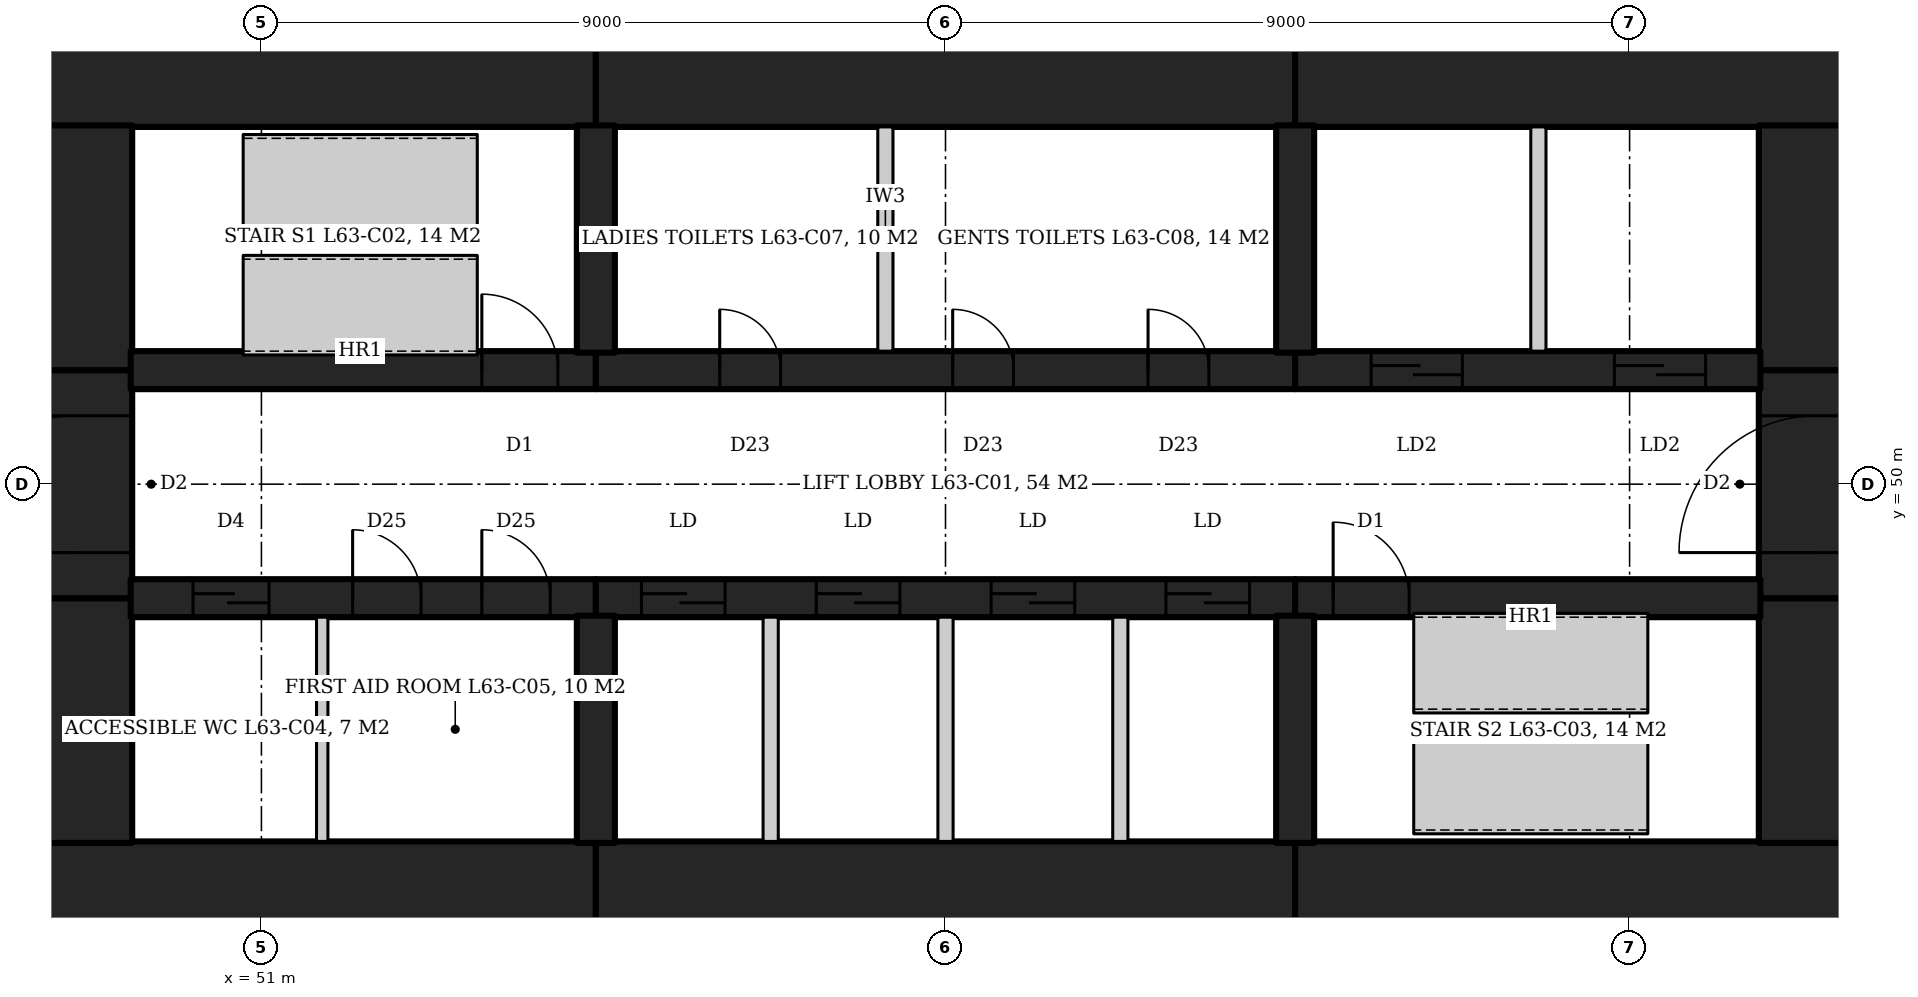
"""IFC4 building model, lengths in metres.
Left out: names, types, materials, properties, quantities, classifications, styles, units other than length and angle.
Written with IfcOpenShell. Run it as: python <this file> out.ifc"""

import sys

from ifc_helpers import new_model, si_unit, direction, frame, frame_2d, origin, place, context, subcontext, project, spatial, rectangle, extrude, element, fill, save


model = new_model("IFC4")
c1 = context("Model", 3, precision=1e-05, world=origin(), true_north=direction((0.0, 1.0)))
c2 = subcontext(c1, "Body", "Model", "MODEL_VIEW")
j1 = project(units=[si_unit("LENGTHUNIT", "METRE"), si_unit("PLANEANGLEUNIT", "RADIAN")], contexts=[c1])
p1 = place(None, origin())
s1 = spatial("IfcSite", under=j1, at=p1, CompositionType="ELEMENT")
p2 = place(p1, origin())
s2 = spatial("IfcBuilding", under=s1, at=p2, CompositionType="ELEMENT")
p3 = place(p2, frame((0.0, 0.0, 269.6)))
s3 = spatial("IfcBuildingStorey", under=s2, at=p3, CompositionType="ELEMENT", Elevation=269.6)
p4 = place(p3, frame((47.8, 55.45, 0.0), z_axis=(0.0, 0.0, 1.0), x_axis=(1.0, 0.0, 0.0)))
e1 = element("IfcWall", 1, at=p4, inside=s3, PredefinedType="SHEAR", context=c2, shape_type="SweptSolid", body=[
    extrude(rectangle(XDim=7.6, YDim=1.5, at=frame_2d((3.8, 0.0))), origin(), (0.0, 0.0, 1.0), 4.2),
])
p5 = place(p3, frame((55.4, 55.45, 0.0), z_axis=(0.0, 0.0, 1.0), x_axis=(1.0, 0.0, 0.0)))
e2 = element("IfcWall", 2, at=p5, inside=s3, PredefinedType="SHEAR", context=c2, shape_type="SweptSolid", body=[
    extrude(rectangle(XDim=9.2, YDim=1.5, at=frame_2d((4.6, 0.0))), origin(), (0.0, 0.0, 1.0), 4.2),
])
for number, where, z_axis, x_axis in (
    (3, (64.6, 55.45, 0.0), (0.0, 0.0, 1.0), (1.0, 0.0, 0.0)),
    (4, (47.8, 44.55, 0.0), (0.0, 0.0, 1.0), (1.0, 0.0, 0.0)),
):
    element("IfcWall", number, at=place(p3, frame(where, z_axis=z_axis, x_axis=x_axis)), inside=s3, PredefinedType="SHEAR", context=c2, shape_type="SweptSolid", body=[
        extrude(rectangle(XDim=7.6, YDim=1.5, at=frame_2d((3.8, 0.0))), origin(), (0.0, 0.0, 1.0), 4.2),
    ])
p6 = place(p3, frame((55.4, 44.55, 0.0), z_axis=(0.0, 0.0, 1.0), x_axis=(1.0, 0.0, 0.0)))
e5 = element("IfcWall", 5, at=p6, inside=s3, PredefinedType="SHEAR", context=c2, shape_type="SweptSolid", body=[
    extrude(rectangle(XDim=9.2, YDim=1.5, at=frame_2d((4.6, 0.0))), origin(), (0.0, 0.0, 1.0), 4.2),
])
p7 = place(p3, frame((64.6, 44.55, 0.0), z_axis=(0.0, 0.0, 1.0), x_axis=(1.0, 0.0, 0.0)))
e6 = element("IfcWall", 6, at=p7, inside=s3, PredefinedType="SHEAR", context=c2, shape_type="SweptSolid", body=[
    extrude(rectangle(XDim=7.6, YDim=1.5, at=frame_2d((3.8, 0.0))), origin(), (0.0, 0.0, 1.0), 4.2),
])
p8 = place(p3, frame((71.45, 45.28, 0.0), z_axis=(0.0, 0.0, 1.0), x_axis=(0.0, 1.0, 0.0)))
e7 = element("IfcWall", 7, at=p8, inside=s3, PredefinedType="SHEAR", context=c2, shape_type="SweptSolid", body=[
    extrude(rectangle(XDim=3.22, YDim=1.5, at=frame_2d((1.61, 0.0))), origin(), (0.0, 0.0, 1.0), 4.2),
])
p9 = place(p3, frame((71.45, 48.5, 0.0), z_axis=(0.0, 0.0, 1.0), x_axis=(0.0, 1.0, 0.0)))
e8 = element("IfcWall", 8, at=p9, inside=s3, PredefinedType="SHEAR", context=c2, shape_type="SweptSolid", body=[
    extrude(rectangle(XDim=3.0, YDim=1.5, at=frame_2d((1.5, 0.0))), origin(), (0.0, 0.0, 1.0), 4.2),
])
p10 = place(p9, frame((0.6, 0.0, 0.0)))
e9 = element("IfcOpeningElement", 9, at=p10, cuts=e8, PredefinedType="OPENING", context=c2, shape_type="SweptSolid", body=[
    extrude(rectangle(XDim=1.8, YDim=2.1, at=frame_2d((0.9, 1.05))), frame((0.0, 0.76, 0.0), z_axis=(0.0, -1.0, 0.0), x_axis=(1.0, 0.0, 0.0)), (0.0, 0.0, 1.0), 1.52),
])
for number, where, z_axis, x_axis in (
    (10, (71.45, 51.5, 0.0), (0.0, 0.0, 1.0), (0.0, 1.0, 0.0)),
    (11, (48.55, 45.28, 0.0), (0.0, 0.0, 1.0), (0.0, 1.0, 0.0)),
):
    element("IfcWall", number, at=place(p3, frame(where, z_axis=z_axis, x_axis=x_axis)), inside=s3, PredefinedType="SHEAR", context=c2, shape_type="SweptSolid", body=[
        extrude(rectangle(XDim=3.22, YDim=1.5, at=frame_2d((1.61, 0.0))), origin(), (0.0, 0.0, 1.0), 4.2),
    ])
p11 = place(p3, frame((48.55, 48.5, 0.0), z_axis=(0.0, 0.0, 1.0), x_axis=(0.0, 1.0, 0.0)))
e12 = element("IfcWall", 12, at=p11, inside=s3, PredefinedType="SHEAR", context=c2, shape_type="SweptSolid", body=[
    extrude(rectangle(XDim=3.0, YDim=1.5, at=frame_2d((1.5, 0.0))), origin(), (0.0, 0.0, 1.0), 4.2),
])
p12 = place(p11, frame((0.6, 0.0, 0.0)))
e13 = element("IfcOpeningElement", 13, at=p12, cuts=e12, PredefinedType="OPENING", context=c2, shape_type="SweptSolid", body=[
    extrude(rectangle(XDim=1.8, YDim=2.1, at=frame_2d((0.9, 1.05))), frame((0.0, 0.76, 0.0), z_axis=(0.0, -1.0, 0.0), x_axis=(1.0, 0.0, 0.0)), (0.0, 0.0, 1.0), 1.52),
])
p13 = place(p3, frame((48.55, 51.5, 0.0), z_axis=(0.0, 0.0, 1.0), x_axis=(0.0, 1.0, 0.0)))
e14 = element("IfcWall", 14, at=p13, inside=s3, PredefinedType="SHEAR", context=c2, shape_type="SweptSolid", body=[
    extrude(rectangle(XDim=3.22, YDim=1.5, at=frame_2d((1.61, 0.0))), origin(), (0.0, 0.0, 1.0), 4.2),
])
p14 = place(p3, frame((49.28, 51.5, 0.0), z_axis=(0.0, 0.0, 1.0), x_axis=(1.0, 0.0, 0.0)))
e15 = element("IfcWall", 15, at=p14, inside=s3, PredefinedType="SHEAR", context=c2, shape_type="SweptSolid", body=[
    extrude(rectangle(XDim=6.12, YDim=0.35, at=frame_2d((3.06, 0.0))), origin(), (0.0, 0.0, 1.0), 4.2),
])
p15 = place(p14, frame((4.62, 0.0, 0.0)))
e16 = element("IfcOpeningElement", 16, at=p15, cuts=e15, PredefinedType="OPENING", context=c2, shape_type="SweptSolid", body=[
    extrude(rectangle(XDim=1.0, YDim=2.1, at=frame_2d((0.5, 1.05))), frame((0.0, 0.185, 0.0), z_axis=(0.0, -1.0, 0.0), x_axis=(1.0, 0.0, 0.0)), (0.0, 0.0, 1.0), 0.37),
])
p16 = place(p3, frame((55.4, 51.5, 0.0), z_axis=(0.0, 0.0, 1.0), x_axis=(1.0, 0.0, 0.0)))
e17 = element("IfcWall", 17, at=p16, inside=s3, PredefinedType="SHEAR", context=c2, shape_type="SweptSolid", body=[
    extrude(rectangle(XDim=9.2, YDim=0.35, at=frame_2d((4.6, 0.0))), origin(), (0.0, 0.0, 1.0), 4.2),
])
p17 = place(p16, frame((1.585, 0.0, 0.0)))
e18 = element("IfcOpeningElement", 18, at=p17, cuts=e17, PredefinedType="OPENING", context=c2, shape_type="SweptSolid", body=[
    extrude(rectangle(XDim=0.8, YDim=2.1, at=frame_2d((0.4, 1.05))), frame((0.0, 0.185, 0.0), z_axis=(0.0, -1.0, 0.0), x_axis=(1.0, 0.0, 0.0)), (0.0, 0.0, 1.0), 0.37),
])
p18 = place(p16, frame((4.703, 0.0, 0.0)))
e19 = element("IfcOpeningElement", 19, at=p18, cuts=e17, PredefinedType="OPENING", context=c2, shape_type="SweptSolid", body=[
    extrude(rectangle(XDim=0.8, YDim=2.1, at=frame_2d((0.4, 1.05))), frame((0.0, 0.185, 0.0), z_axis=(0.0, -1.0, 0.0), x_axis=(1.0, 0.0, 0.0)), (0.0, 0.0, 1.0), 0.37),
])
p19 = place(p16, frame((7.318, 0.0, 0.0)))
e20 = element("IfcOpeningElement", 20, at=p19, cuts=e17, PredefinedType="OPENING", context=c2, shape_type="SweptSolid", body=[
    extrude(rectangle(XDim=0.8, YDim=2.1, at=frame_2d((0.4, 1.05))), frame((0.0, 0.185, 0.0), z_axis=(0.0, -1.0, 0.0), x_axis=(1.0, 0.0, 0.0)), (0.0, 0.0, 1.0), 0.37),
])
p20 = place(p3, frame((64.6, 51.5, 0.0), z_axis=(0.0, 0.0, 1.0), x_axis=(1.0, 0.0, 0.0)))
e21 = element("IfcWall", 21, at=p20, inside=s3, PredefinedType="SHEAR", context=c2, shape_type="SweptSolid", body=[
    extrude(rectangle(XDim=6.12, YDim=0.35, at=frame_2d((3.06, 0.0))), origin(), (0.0, 0.0, 1.0), 4.2),
])
p21 = place(p20, frame((1.0, 0.0, 0.0)))
e22 = element("IfcOpeningElement", 22, at=p21, cuts=e21, PredefinedType="OPENING", context=c2, shape_type="SweptSolid", body=[
    extrude(rectangle(XDim=1.2, YDim=2.1, at=frame_2d((0.6, 1.05))), frame((0.0, 0.185, 0.0), z_axis=(0.0, -1.0, 0.0), x_axis=(1.0, 0.0, 0.0)), (0.0, 0.0, 1.0), 0.37),
])
p22 = place(p20, frame((4.2, 0.0, 0.0)))
e23 = element("IfcOpeningElement", 23, at=p22, cuts=e21, PredefinedType="OPENING", context=c2, shape_type="SweptSolid", body=[
    extrude(rectangle(XDim=1.2, YDim=2.1, at=frame_2d((0.6, 1.05))), frame((0.0, 0.185, 0.0), z_axis=(0.0, -1.0, 0.0), x_axis=(1.0, 0.0, 0.0)), (0.0, 0.0, 1.0), 0.37),
])
p23 = place(p3, frame((49.28, 48.5, 0.0), z_axis=(0.0, 0.0, 1.0), x_axis=(1.0, 0.0, 0.0)))
e24 = element("IfcWall", 24, at=p23, inside=s3, PredefinedType="SHEAR", context=c2, shape_type="SweptSolid", body=[
    extrude(rectangle(XDim=6.12, YDim=0.35, at=frame_2d((3.06, 0.0))), origin(), (0.0, 0.0, 1.0), 4.2),
])
p24 = place(p23, frame((0.82, 0.0, 0.0)))
e25 = element("IfcOpeningElement", 25, at=p24, cuts=e24, PredefinedType="OPENING", context=c2, shape_type="SweptSolid", body=[
    extrude(rectangle(XDim=1.0, YDim=2.1, at=frame_2d((0.5, 1.05))), frame((0.0, 0.185, 0.0), z_axis=(0.0, -1.0, 0.0), x_axis=(1.0, 0.0, 0.0)), (0.0, 0.0, 1.0), 0.37),
])
p25 = place(p23, frame((2.92, 0.0, 0.0)))
e26 = element("IfcOpeningElement", 26, at=p25, cuts=e24, PredefinedType="OPENING", context=c2, shape_type="SweptSolid", body=[
    extrude(rectangle(XDim=0.9, YDim=2.1, at=frame_2d((0.45, 1.05))), frame((0.0, 0.185, 0.0), z_axis=(0.0, -1.0, 0.0), x_axis=(1.0, 0.0, 0.0)), (0.0, 0.0, 1.0), 0.37),
])
p26 = place(p23, frame((4.62, 0.0, 0.0)))
e27 = element("IfcOpeningElement", 27, at=p26, cuts=e24, PredefinedType="OPENING", context=c2, shape_type="SweptSolid", body=[
    extrude(rectangle(XDim=0.9, YDim=2.1, at=frame_2d((0.45, 1.05))), frame((0.0, 0.185, 0.0), z_axis=(0.0, -1.0, 0.0), x_axis=(1.0, 0.0, 0.0)), (0.0, 0.0, 1.0), 0.37),
])
p27 = place(p3, frame((55.4, 48.5, 0.0), z_axis=(0.0, 0.0, 1.0), x_axis=(1.0, 0.0, 0.0)))
e28 = element("IfcWall", 28, at=p27, inside=s3, PredefinedType="SHEAR", context=c2, shape_type="SweptSolid", body=[
    extrude(rectangle(XDim=9.2, YDim=0.35, at=frame_2d((4.6, 0.0))), origin(), (0.0, 0.0, 1.0), 4.2),
])
p28 = place(p27, frame((0.6, 0.0, 0.0)))
e29 = element("IfcOpeningElement", 29, at=p28, cuts=e28, PredefinedType="OPENING", context=c2, shape_type="SweptSolid", body=[
    extrude(rectangle(XDim=1.1, YDim=2.1, at=frame_2d((0.55, 1.05))), frame((0.0, 0.185, 0.0), z_axis=(0.0, -1.0, 0.0), x_axis=(1.0, 0.0, 0.0)), (0.0, 0.0, 1.0), 0.37),
])
p29 = place(p27, frame((2.9, 0.0, 0.0)))
e30 = element("IfcOpeningElement", 30, at=p29, cuts=e28, PredefinedType="OPENING", context=c2, shape_type="SweptSolid", body=[
    extrude(rectangle(XDim=1.1, YDim=2.1, at=frame_2d((0.55, 1.05))), frame((0.0, 0.185, 0.0), z_axis=(0.0, -1.0, 0.0), x_axis=(1.0, 0.0, 0.0)), (0.0, 0.0, 1.0), 0.37),
])
p30 = place(p27, frame((5.2, 0.0, 0.0)))
e31 = element("IfcOpeningElement", 31, at=p30, cuts=e28, PredefinedType="OPENING", context=c2, shape_type="SweptSolid", body=[
    extrude(rectangle(XDim=1.1, YDim=2.1, at=frame_2d((0.55, 1.05))), frame((0.0, 0.185, 0.0), z_axis=(0.0, -1.0, 0.0), x_axis=(1.0, 0.0, 0.0)), (0.0, 0.0, 1.0), 0.37),
])
p31 = place(p27, frame((7.5, 0.0, 0.0)))
e32 = element("IfcOpeningElement", 32, at=p31, cuts=e28, PredefinedType="OPENING", context=c2, shape_type="SweptSolid", body=[
    extrude(rectangle(XDim=1.1, YDim=2.1, at=frame_2d((0.55, 1.05))), frame((0.0, 0.185, 0.0), z_axis=(0.0, -1.0, 0.0), x_axis=(1.0, 0.0, 0.0)), (0.0, 0.0, 1.0), 0.37),
])
p32 = place(p3, frame((64.6, 48.5, 0.0), z_axis=(0.0, 0.0, 1.0), x_axis=(1.0, 0.0, 0.0)))
e33 = element("IfcWall", 33, at=p32, inside=s3, PredefinedType="SHEAR", context=c2, shape_type="SweptSolid", body=[
    extrude(rectangle(XDim=6.12, YDim=0.35, at=frame_2d((3.06, 0.0))), origin(), (0.0, 0.0, 1.0), 4.2),
])
p33 = place(p32, frame((0.5, 0.0, 0.0)))
e34 = element("IfcOpeningElement", 34, at=p33, cuts=e33, PredefinedType="OPENING", context=c2, shape_type="SweptSolid", body=[
    extrude(rectangle(XDim=1.0, YDim=2.1, at=frame_2d((0.5, 1.05))), frame((0.0, 0.185, 0.0), z_axis=(0.0, -1.0, 0.0), x_axis=(1.0, 0.0, 0.0)), (0.0, 0.0, 1.0), 0.37),
])
for number, where, z_axis, x_axis in (
    (35, (55.4, 51.655, 0.0), (0.0, 0.0, 1.0), (0.0, 1.0, 0.0)),
    (36, (64.6, 51.655, 0.0), (0.0, 0.0, 1.0), (0.0, 1.0, 0.0)),
    (37, (55.4, 48.345, 0.0), (0.0, 0.0, 1.0), (0.0, -1.0, 0.0)),
    (38, (64.6, 48.345, 0.0), (0.0, 0.0, 1.0), (0.0, -1.0, 0.0)),
):
    element("IfcWall", number, at=place(p3, frame(where, z_axis=z_axis, x_axis=x_axis)), inside=s3, PredefinedType="SHEAR", context=c2, shape_type="SweptSolid", body=[
        extrude(rectangle(XDim=3.065, YDim=0.35, at=frame_2d((1.532, 0.0))), origin(), (0.0, 0.0, 1.0), 4.2),
    ])
for number, where, z_axis, x_axis in (
    (39, (57.7, 45.3, 0.0), (0.0, 0.0, 1.0), (0.0, 1.0, 0.0)),
    (40, (60.0, 45.3, 0.0), (0.0, 0.0, 1.0), (0.0, 1.0, 0.0)),
    (41, (62.3, 45.3, 0.0), (0.0, 0.0, 1.0), (0.0, 1.0, 0.0)),
    (42, (67.8, 51.675, 0.0), (0.0, 0.0, 1.0), (0.0, 1.0, 0.0)),
):
    element("IfcWall", number, at=place(p3, frame(where, z_axis=z_axis, x_axis=x_axis)), inside=s3, PredefinedType="PARTITIONING", context=c2, shape_type="SweptSolid", body=[
        extrude(rectangle(XDim=3.025, YDim=0.2, at=frame_2d((1.512, 0.0))), origin(), (0.0, 0.0, 1.0), 4.2),
    ])
p34 = place(p3, frame((51.8, 45.3, 0.0), z_axis=(0.0, 0.0, 1.0), x_axis=(0.0, 1.0, 0.0)))
e43 = element("IfcWall", 43, at=p34, inside=s3, PredefinedType="PARTITIONING", context=c2, shape_type="SweptSolid", body=[
    extrude(rectangle(XDim=3.025, YDim=0.15, at=frame_2d((1.512, 0.0))), origin(), (0.0, 0.0, 1.0), 4.04),
])
p35 = place(p3, frame((59.196, 51.675, 0.0), z_axis=(0.0, 0.0, 1.0), x_axis=(0.0, 1.0, 0.0)))
e44 = element("IfcWall", 44, at=p35, inside=s3, PredefinedType="PARTITIONING", context=c2, shape_type="SweptSolid", body=[
    extrude(rectangle(XDim=3.025, YDim=0.2, at=frame_2d((1.512, 0.0))), origin(), (0.0, 0.0, 1.0), 4.04),
])
p36 = place(p15, origin())
e45 = element("IfcDoor", 45, at=p36, inside=s3, OperationType="SINGLE_SWING_LEFT", PredefinedType="DOOR", context=c2, shape_type="SweptSolid", body=[
    extrude(rectangle(XDim=1.0, YDim=2.1, at=frame_2d((0.5, 1.05))), frame((0.0, 0.025, 0.0), z_axis=(0.0, -1.0, 0.0), x_axis=(1.0, 0.0, 0.0)), (0.0, 0.0, 1.0), 0.05),
])
fill(e16, e45)
p37 = place(p33, origin())
e46 = element("IfcDoor", 46, at=p37, inside=s3, OperationType="SINGLE_SWING_LEFT", PredefinedType="DOOR", context=c2, shape_type="SweptSolid", body=[
    extrude(rectangle(XDim=1.0, YDim=2.1, at=frame_2d((0.5, 1.05))), frame((0.0, 0.025, 0.0), z_axis=(0.0, -1.0, 0.0), x_axis=(1.0, 0.0, 0.0)), (0.0, 0.0, 1.0), 0.05),
])
fill(e34, e46)
p38 = place(p21, origin())
e47 = element("IfcDoor", 47, at=p38, inside=s3, OperationType="SLIDING_TO_LEFT", PredefinedType="DOOR", context=c2, shape_type="SweptSolid", body=[
    extrude(rectangle(XDim=1.2, YDim=2.1, at=frame_2d((0.6, 1.05))), frame((0.0, 0.025, 0.0), z_axis=(0.0, -1.0, 0.0), x_axis=(1.0, 0.0, 0.0)), (0.0, 0.0, 1.0), 0.05),
])
fill(e22, e47)
p39 = place(p22, origin())
e48 = element("IfcDoor", 48, at=p39, inside=s3, OperationType="SLIDING_TO_LEFT", PredefinedType="DOOR", context=c2, shape_type="SweptSolid", body=[
    extrude(rectangle(XDim=1.2, YDim=2.1, at=frame_2d((0.6, 1.05))), frame((0.0, 0.025, 0.0), z_axis=(0.0, -1.0, 0.0), x_axis=(1.0, 0.0, 0.0)), (0.0, 0.0, 1.0), 0.05),
])
fill(e23, e48)
p40 = place(p28, origin())
e49 = element("IfcDoor", 49, at=p40, inside=s3, OperationType="SLIDING_TO_LEFT", PredefinedType="DOOR", context=c2, shape_type="SweptSolid", body=[
    extrude(rectangle(XDim=1.1, YDim=2.1, at=frame_2d((0.55, 1.05))), frame((0.0, 0.025, 0.0), z_axis=(0.0, -1.0, 0.0), x_axis=(1.0, 0.0, 0.0)), (0.0, 0.0, 1.0), 0.05),
])
fill(e29, e49)
p41 = place(p29, origin())
e50 = element("IfcDoor", 50, at=p41, inside=s3, OperationType="SLIDING_TO_LEFT", PredefinedType="DOOR", context=c2, shape_type="SweptSolid", body=[
    extrude(rectangle(XDim=1.1, YDim=2.1, at=frame_2d((0.55, 1.05))), frame((0.0, 0.025, 0.0), z_axis=(0.0, -1.0, 0.0), x_axis=(1.0, 0.0, 0.0)), (0.0, 0.0, 1.0), 0.05),
])
fill(e30, e50)
p42 = place(p30, origin())
e51 = element("IfcDoor", 51, at=p42, inside=s3, OperationType="SLIDING_TO_LEFT", PredefinedType="DOOR", context=c2, shape_type="SweptSolid", body=[
    extrude(rectangle(XDim=1.1, YDim=2.1, at=frame_2d((0.55, 1.05))), frame((0.0, 0.025, 0.0), z_axis=(0.0, -1.0, 0.0), x_axis=(1.0, 0.0, 0.0)), (0.0, 0.0, 1.0), 0.05),
])
fill(e31, e51)
p43 = place(p31, origin())
e52 = element("IfcDoor", 52, at=p43, inside=s3, OperationType="SLIDING_TO_LEFT", PredefinedType="DOOR", context=c2, shape_type="SweptSolid", body=[
    extrude(rectangle(XDim=1.1, YDim=2.1, at=frame_2d((0.55, 1.05))), frame((0.0, 0.025, 0.0), z_axis=(0.0, -1.0, 0.0), x_axis=(1.0, 0.0, 0.0)), (0.0, 0.0, 1.0), 0.05),
])
fill(e32, e52)
p44 = place(p24, origin())
e53 = element("IfcDoor", 53, at=p44, inside=s3, OperationType="SLIDING_TO_LEFT", PredefinedType="DOOR", context=c2, shape_type="SweptSolid", body=[
    extrude(rectangle(XDim=1.0, YDim=2.1, at=frame_2d((0.5, 1.05))), frame((0.0, 0.025, 0.0), z_axis=(0.0, -1.0, 0.0), x_axis=(1.0, 0.0, 0.0)), (0.0, 0.0, 1.0), 0.05),
])
fill(e25, e53)
p45 = place(p25, origin())
e54 = element("IfcDoor", 54, at=p45, inside=s3, OperationType="SINGLE_SWING_RIGHT", PredefinedType="DOOR", context=c2, shape_type="SweptSolid", body=[
    extrude(rectangle(XDim=0.9, YDim=2.1, at=frame_2d((0.45, 1.05))), frame((0.0, 0.025, 0.0), z_axis=(0.0, -1.0, 0.0), x_axis=(1.0, 0.0, 0.0)), (0.0, 0.0, 1.0), 0.05),
])
fill(e26, e54)
p46 = place(p26, origin())
e55 = element("IfcDoor", 55, at=p46, inside=s3, OperationType="SINGLE_SWING_RIGHT", PredefinedType="DOOR", context=c2, shape_type="SweptSolid", body=[
    extrude(rectangle(XDim=0.9, YDim=2.1, at=frame_2d((0.45, 1.05))), frame((0.0, 0.025, 0.0), z_axis=(0.0, -1.0, 0.0), x_axis=(1.0, 0.0, 0.0)), (0.0, 0.0, 1.0), 0.05),
])
fill(e27, e55)
p47 = place(p10, origin())
e56 = element("IfcDoor", 56, at=p47, inside=s3, OperationType="DOUBLE_DOOR_DOUBLE_SWING", PredefinedType="DOOR", context=c2, shape_type="SweptSolid", body=[
    extrude(rectangle(XDim=1.8, YDim=2.1, at=frame_2d((0.9, 1.05))), frame((0.0, 0.025, 0.0), z_axis=(0.0, -1.0, 0.0), x_axis=(1.0, 0.0, 0.0)), (0.0, 0.0, 1.0), 0.05),
])
fill(e9, e56)
p48 = place(p12, origin())
e57 = element("IfcDoor", 57, at=p48, inside=s3, OperationType="DOUBLE_DOOR_DOUBLE_SWING", PredefinedType="DOOR", context=c2, shape_type="SweptSolid", body=[
    extrude(rectangle(XDim=1.8, YDim=2.1, at=frame_2d((0.9, 1.05))), frame((0.0, 0.025, 0.0), z_axis=(0.0, -1.0, 0.0), x_axis=(1.0, 0.0, 0.0)), (0.0, 0.0, 1.0), 0.05),
])
fill(e13, e57)
p49 = place(p17, origin())
e58 = element("IfcDoor", 58, at=p49, inside=s3, OperationType="SINGLE_SWING_LEFT", PredefinedType="DOOR", context=c2, shape_type="SweptSolid", body=[
    extrude(rectangle(XDim=0.8, YDim=2.1, at=frame_2d((0.4, 1.05))), frame((0.0, 0.025, 0.0), z_axis=(0.0, -1.0, 0.0), x_axis=(1.0, 0.0, 0.0)), (0.0, 0.0, 1.0), 0.05),
])
fill(e18, e58)
p50 = place(p18, origin())
e59 = element("IfcDoor", 59, at=p50, inside=s3, OperationType="SINGLE_SWING_LEFT", PredefinedType="DOOR", context=c2, shape_type="SweptSolid", body=[
    extrude(rectangle(XDim=0.8, YDim=2.1, at=frame_2d((0.4, 1.05))), frame((0.0, 0.025, 0.0), z_axis=(0.0, -1.0, 0.0), x_axis=(1.0, 0.0, 0.0)), (0.0, 0.0, 1.0), 0.05),
])
fill(e19, e59)
p51 = place(p19, origin())
e60 = element("IfcDoor", 60, at=p51, inside=s3, OperationType="SINGLE_SWING_LEFT", PredefinedType="DOOR", context=c2, shape_type="SweptSolid", body=[
    extrude(rectangle(XDim=0.8, YDim=2.1, at=frame_2d((0.4, 1.05))), frame((0.0, 0.025, 0.0), z_axis=(0.0, -1.0, 0.0), x_axis=(1.0, 0.0, 0.0)), (0.0, 0.0, 1.0), 0.05),
])
fill(e20, e60)
save(model, sys.argv[1])
